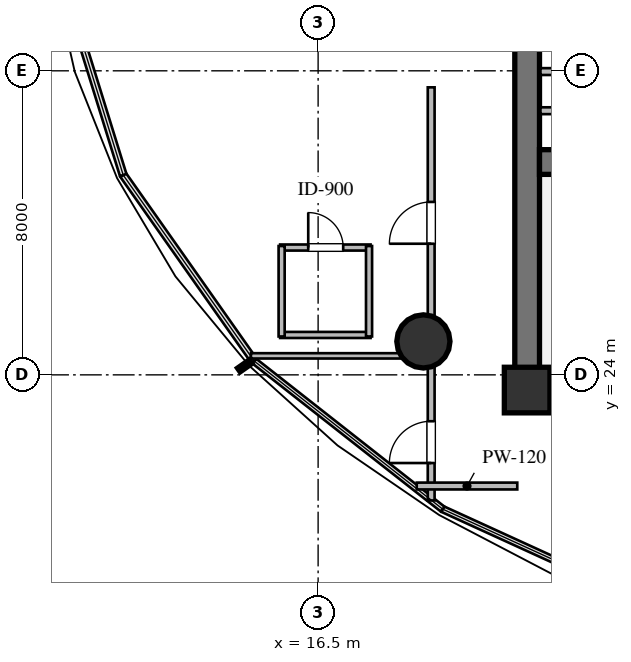
"""IFC4 building model, lengths in metres.
Left out: names, types, materials, properties, quantities, classifications, styles, units other than length and angle.
Written with IfcOpenShell. Run it as: python <this file> out.ifc"""

import sys

from ifc_helpers import new_model, si_unit, direction, frame, frame_2d, origin, origin_2d, place, context, subcontext, project, spatial, rectangle, circle, extrude, element, fill, save


model = new_model("IFC4")
c1 = context("Model", 3, precision=1e-05, world=origin(), true_north=direction((0.0, 1.0)))
c2 = subcontext(c1, "Body", "Model", "MODEL_VIEW")
j1 = project(units=[si_unit("LENGTHUNIT", "METRE"), si_unit("PLANEANGLEUNIT", "RADIAN")], contexts=[c1])
p1 = place(None, origin())
s1 = spatial("IfcSite", under=j1, at=p1, CompositionType="ELEMENT")
p2 = place(p1, origin())
s2 = spatial("IfcBuilding", under=s1, at=p2, CompositionType="ELEMENT")
p3 = place(p2, frame((0.0, 0.0, 45.6)))
s3 = spatial("IfcBuildingStorey", under=s2, at=p3, CompositionType="ELEMENT", Elevation=45.6)
p4 = place(p3, frame((21.675, 23.6, 0.0), z_axis=(0.0, 0.0, 1.0), x_axis=(1.0, 0.0, 0.0)))
e1 = element("IfcWall", 1, at=p4, inside=s3, PredefinedType="SHEAR", context=c2, shape_type="SweptSolid", body=[
    extrude(rectangle(XDim=22.65, YDim=0.65, at=frame_2d((11.325, 0.0))), origin(), (0.0, 0.0, 1.0), 3.36),
])
p5 = place(p3, frame((22.0, 23.925, 0.0), z_axis=(0.0, 0.0, 1.0), x_axis=(0.0, 1.0, 0.0)))
e2 = element("IfcWall", 2, at=p5, inside=s3, PredefinedType="SHEAR", context=c2, shape_type="SweptSolid", body=[
    extrude(rectangle(XDim=12.15, YDim=0.65, at=frame_2d((6.075, 0.0))), origin(), (0.0, 0.0, 1.0), 3.36),
])
p6 = place(p3, frame((22.325, 29.6, 0.0), z_axis=(0.0, 0.0, 1.0), x_axis=(1.0, 0.0, 0.0)))
e3 = element("IfcWall", 3, at=p6, inside=s3, PredefinedType="SHEAR", context=c2, shape_type="SweptSolid", body=[
    extrude(rectangle(XDim=21.35, YDim=0.65, at=frame_2d((10.675, 0.0))), origin(), (0.0, 0.0, 1.0), 3.36),
])
p7 = place(p6, frame((12.125, 0.0, 0.0)))
e4 = element("IfcOpeningElement", 4, at=p7, cuts=e3, PredefinedType="OPENING", context=c2, shape_type="SweptSolid", body=[
    extrude(rectangle(XDim=1.15, YDim=2.1, at=frame_2d((0.575, 1.05))), frame((0.0, 0.335, 0.0), z_axis=(0.0, -1.0, 0.0), x_axis=(1.0, 0.0, 0.0)), (0.0, 0.0, 1.0), 0.67),
])
p8 = place(p3, frame((22.0, 23.6, 0.0), z_axis=(0.0, 0.0, 1.0), x_axis=(1.0, 0.0, 0.0)))
e5 = element("IfcColumn", 5, at=p8, inside=s3, PredefinedType="COLUMN", context=c2, shape_type="SweptSolid", body=[
    extrude(rectangle(XDim=1.2, YDim=1.2, at=origin_2d()), origin(), (0.0, 0.0, 1.0), 3.6),
])
p9 = place(p3, frame((19.27, 24.88, 0.0), z_axis=(0.0, 0.0, 1.0), x_axis=(1.0, 0.0, 0.0)))
e6 = element("IfcColumn", 6, at=p9, inside=s3, PredefinedType="COLUMN", context=c2, shape_type="SweptSolid", body=[
    extrude(circle(Radius=0.7, at=origin_2d()), origin(), (0.0, 0.0, 1.0), 3.6),
])
p10 = place(p3, frame((22.35, 30.95, 0.0), z_axis=(0.0, 0.0, 1.0), x_axis=(1.0, 0.0, 0.0)))
e7 = element("IfcWall", 7, at=p10, inside=s3, PredefinedType="PARTITIONING", context=c2, shape_type="SweptSolid", body=[
    extrude(rectangle(XDim=3.75, YDim=0.18, at=frame_2d((1.875, 0.0))), origin(), (0.0, 0.0, 1.0), 3.36),
])
p11 = place(p10, frame((1.988, 0.0, 0.0)))
e8 = element("IfcOpeningElement", 8, at=p11, cuts=e7, PredefinedType="OPENING", context=c2, shape_type="SweptSolid", body=[
    extrude(rectangle(XDim=0.92, YDim=2.1, at=frame_2d((0.46, 1.05))), frame((0.0, 0.1, 0.0), z_axis=(0.0, -1.0, 0.0), x_axis=(1.0, 0.0, 0.0)), (0.0, 0.0, 1.0), 0.2),
])
p12 = place(p3, frame((22.35, 31.98, 0.0), z_axis=(0.0, 0.0, 1.0), x_axis=(1.0, 0.0, 0.0)))
e9 = element("IfcWall", 9, at=p12, inside=s3, PredefinedType="PARTITIONING", context=c2, shape_type="SweptSolid", body=[
    extrude(rectangle(XDim=3.75, YDim=0.18, at=frame_2d((1.875, 0.0))), origin(), (0.0, 0.0, 1.0), 3.36),
])
p13 = place(p12, frame((1.238, 0.0, 0.0)))
e10 = element("IfcOpeningElement", 10, at=p13, cuts=e9, PredefinedType="OPENING", context=c2, shape_type="SweptSolid", body=[
    extrude(rectangle(XDim=0.92, YDim=2.1, at=frame_2d((0.46, 1.05))), frame((0.0, 0.1, 0.0), z_axis=(0.0, -1.0, 0.0), x_axis=(1.0, 0.0, 0.0)), (0.0, 0.0, 1.0), 0.2),
])
p14 = place(p3, frame((15.5, 25.05, 0.0), z_axis=(0.0, 0.0, 1.0), x_axis=(1.0, 0.0, 0.0)))
e11 = element("IfcWall", 11, at=p14, inside=s3, PredefinedType="PLUMBINGWALL", context=c2, shape_type="SweptSolid", body=[
    extrude(rectangle(XDim=2.38, YDim=0.16, at=frame_2d((1.19, 0.0))), origin(), (0.0, 0.0, 1.0), 3.36),
])
p15 = place(p3, frame((15.5, 27.35, 0.0), z_axis=(0.0, 0.0, 1.0), x_axis=(1.0, 0.0, 0.0)))
e12 = element("IfcWall", 12, at=p15, inside=s3, PredefinedType="PLUMBINGWALL", context=c2, shape_type="SweptSolid", body=[
    extrude(rectangle(XDim=2.38, YDim=0.16, at=frame_2d((1.19, 0.0))), origin(), (0.0, 0.0, 1.0), 3.36),
])
p16 = place(p15, frame((0.74, 0.0, 0.0)))
e13 = element("IfcOpeningElement", 13, at=p16, cuts=e12, PredefinedType="OPENING", context=c2, shape_type="SweptSolid", body=[
    extrude(rectangle(XDim=0.92, YDim=2.1, at=frame_2d((0.46, 1.05))), frame((0.0, 0.09, 0.0), z_axis=(0.0, -1.0, 0.0), x_axis=(1.0, 0.0, 0.0)), (0.0, 0.0, 1.0), 0.18),
])
for number, where, z_axis, x_axis in (
    (14, (15.54, 25.01, 0.0), (0.0, 0.0, 1.0), (0.0, 1.0, 0.0)),
    (15, (17.84, 25.01, 0.0), (0.0, 0.0, 1.0), (0.0, 1.0, 0.0)),
):
    element("IfcWall", number, at=place(p3, frame(where, z_axis=z_axis, x_axis=x_axis)), inside=s3, PredefinedType="PLUMBINGWALL", context=c2, shape_type="SweptSolid", body=[
        extrude(rectangle(XDim=2.38, YDim=0.16, at=frame_2d((1.19, 0.0))), origin(), (0.0, 0.0, 1.0), 3.36),
    ])
p17 = place(p3, frame((19.475, 20.695, 0.0), z_axis=(0.0, 0.0, 1.0), x_axis=(0.0, 1.0, 0.0)))
e16 = element("IfcWall", 16, at=p17, inside=s3, PredefinedType="PARTITIONING", context=c2, shape_type="SweptSolid", body=[
    extrude(rectangle(XDim=3.87, YDim=0.18, at=frame_2d((1.935, 0.0))), origin(), (0.0, 0.0, 1.0), 2.738),
])
p18 = place(p17, frame((0.985, 0.0, 0.0)))
e17 = element("IfcOpeningElement", 17, at=p18, cuts=e16, PredefinedType="OPENING", context=c2, shape_type="SweptSolid", body=[
    extrude(rectangle(XDim=1.1, YDim=2.1, at=frame_2d((0.55, 1.05))), frame((0.0, 0.1, 0.0), z_axis=(0.0, -1.0, 0.0), x_axis=(1.0, 0.0, 0.0)), (0.0, 0.0, 1.0), 0.2),
])
p19 = place(p3, frame((21.74, 21.075, 0.0), z_axis=(0.0, 0.0, 1.0), x_axis=(-1.0, 0.0, 0.0)))
e18 = element("IfcWall", 18, at=p19, inside=s3, PredefinedType="PARTITIONING", context=c2, shape_type="SweptSolid", body=[
    extrude(rectangle(XDim=2.645, YDim=0.18, at=frame_2d((1.323, 0.0))), origin(), (0.0, 0.0, 1.0), 3.36),
])
p20 = place(p3, frame((19.475, 24.435, 0.0), z_axis=(0.0, 0.0, 1.0), x_axis=(0.0, 1.0, 0.0)))
e19 = element("IfcWall", 19, at=p20, inside=s3, PredefinedType="PARTITIONING", context=c2, shape_type="SweptSolid", body=[
    extrude(rectangle(XDim=7.13, YDim=0.18, at=frame_2d((3.565, 0.0))), origin(), (0.0, 0.0, 1.0), 2.738),
])
p21 = place(p20, frame((3.015, 0.0, 0.0)))
e20 = element("IfcOpeningElement", 20, at=p21, cuts=e19, PredefinedType="OPENING", context=c2, shape_type="SweptSolid", body=[
    extrude(rectangle(XDim=1.1, YDim=2.1, at=frame_2d((0.55, 1.05))), frame((0.0, 0.1, 0.0), z_axis=(0.0, -1.0, 0.0), x_axis=(1.0, 0.0, 0.0)), (0.0, 0.0, 1.0), 0.2),
])
p22 = place(p3, frame((14.732, 24.5, 0.0), z_axis=(0.0, 0.0, 1.0), x_axis=(1.0, 0.0, 0.0)))
e21 = element("IfcWall", 21, at=p22, inside=s3, PredefinedType="PARTITIONING", context=c2, shape_type="SweptSolid", body=[
    extrude(rectangle(XDim=4.773, YDim=0.14, at=frame_2d((2.386, 0.0))), origin(), (0.0, 0.0, 1.0), 2.89),
])
p23 = place(p16, origin())
e22 = element("IfcDoor", 22, at=p23, inside=s3, OperationType="SINGLE_SWING_LEFT", PredefinedType="DOOR", context=c2, shape_type="SweptSolid", body=[
    extrude(rectangle(XDim=0.92, YDim=2.1, at=frame_2d((0.46, 1.05))), frame((0.0, 0.025, 0.0), z_axis=(0.0, -1.0, 0.0), x_axis=(1.0, 0.0, 0.0)), (0.0, 0.0, 1.0), 0.05),
])
fill(e13, e22)
p24 = place(p18, origin())
e23 = element("IfcDoor", 23, at=p24, inside=s3, OperationType="SINGLE_SWING_LEFT", PredefinedType="DOOR", context=c2, shape_type="SweptSolid", body=[
    extrude(rectangle(XDim=1.1, YDim=2.1, at=frame_2d((0.55, 1.05))), frame((0.0, 0.025, 0.0), z_axis=(0.0, -1.0, 0.0), x_axis=(1.0, 0.0, 0.0)), (0.0, 0.0, 1.0), 0.05),
])
fill(e17, e23)
p25 = place(p21, origin())
e24 = element("IfcDoor", 24, at=p25, inside=s3, OperationType="SINGLE_SWING_LEFT", PredefinedType="DOOR", context=c2, shape_type="SweptSolid", body=[
    extrude(rectangle(XDim=1.1, YDim=2.1, at=frame_2d((0.55, 1.05))), frame((0.0, 0.025, 0.0), z_axis=(0.0, -1.0, 0.0), x_axis=(1.0, 0.0, 0.0)), (0.0, 0.0, 1.0), 0.05),
])
fill(e20, e24)
save(model, sys.argv[1])
